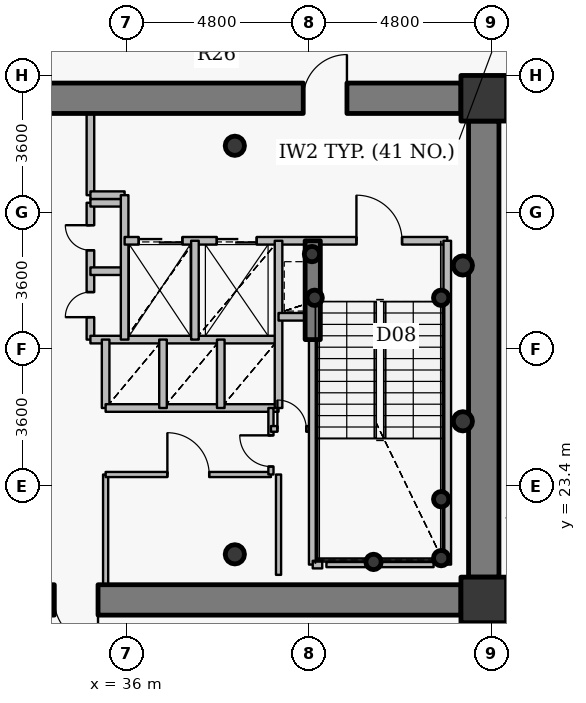
"""IFC4 building model, lengths in metres.
Left out: names, types, materials, properties, quantities, classifications, styles, units other than length and angle.
Written with IfcOpenShell. Run it as: python <this file> out.ifc"""

import sys

from ifc_helpers import new_model, si_unit, direction, frame, frame_2d, origin, origin_2d, place, context, subcontext, project, spatial, rectangle, hollow_circle, extrude, source, transform, mapped, element, fill, save


model = new_model("IFC4")
c1 = context("Model", 3, precision=1e-05, world=origin(), true_north=direction((0.0, 1.0)))
c2 = subcontext(c1, "Body", "Model", "MODEL_VIEW")
j1 = project(units=[si_unit("LENGTHUNIT", "METRE"), si_unit("PLANEANGLEUNIT", "RADIAN")], contexts=[c1])
p1 = place(None, origin())
s1 = spatial("IfcSite", under=j1, at=p1, CompositionType="ELEMENT")
p2 = place(p1, origin())
s2 = spatial("IfcBuilding", under=s1, at=p2, CompositionType="ELEMENT")
p3 = place(p2, frame((0.0, 0.0, 182.4)))
s3 = spatial("IfcBuildingStorey", under=s2, at=p3, CompositionType="ELEMENT", Elevation=182.4)
for number, where, z_axis, x_axis in (
    (1, (45.4, 20.4, 0.0), (0.0, 0.0, 1.0), (1.0, 0.0, 0.0)),
    (2, (45.4, 33.6, 0.0), (0.0, 0.0, 1.0), (1.0, 0.0, 0.0)),
):
    element("IfcColumn", number, at=place(p3, frame(where, z_axis=z_axis, x_axis=x_axis)), inside=s3, PredefinedType="COLUMN", context=c2, shape_type="SweptSolid", body=[
        extrude(rectangle(XDim=1.2, YDim=1.2, at=origin_2d()), origin(), (0.0, 0.0, 1.0), 3.75),
    ])
for number, where, z_axis, x_axis in (
    (3, (38.85, 21.6, 0.0), (0.0, 0.0, 1.0), (1.0, 0.0, 0.0)),
    (4, (38.85, 32.35, 0.0), (0.0, 0.0, 1.0), (1.0, 0.0, 0.0)),
):
    element("IfcColumn", number, at=place(p3, frame(where, z_axis=z_axis, x_axis=x_axis)), inside=s3, PredefinedType="COLUMN", context=c2, shape_type="SweptSolid", body=[
        extrude(hollow_circle(Radius=0.254, WallThickness=0.02, at=origin_2d()), origin(), (0.0, 0.0, 1.0), 3.75),
    ])
for number, where, z_axis, x_axis in (
    (5, (44.28, 21.5, 0.0), (0.0, 0.0, 1.0), (1.0, 0.0, 0.0)),
    (6, (44.28, 23.05, 0.0), (0.0, 0.0, 1.0), (1.0, 0.0, 0.0)),
    (7, (42.5, 21.4, 0.0), (0.0, 0.0, 1.0), (1.0, 0.0, 0.0)),
    (8, (40.95, 28.35, 0.0), (0.0, 0.0, 1.0), (1.0, 0.0, 0.0)),
    (9, (44.28, 28.35, 0.0), (0.0, 0.0, 1.0), (1.0, 0.0, 0.0)),
    (10, (40.88, 29.5, 0.0), (0.0, 0.0, 1.0), (1.0, 0.0, 0.0)),
):
    element("IfcColumn", number, at=place(p3, frame(where, z_axis=z_axis, x_axis=x_axis)), inside=s3, PredefinedType="COLUMN", context=c2, shape_type="SweptSolid", body=[
        extrude(hollow_circle(Radius=0.203, WallThickness=0.016, at=origin_2d()), origin(), (0.0, 0.0, 1.0), 3.75),
    ])
p4 = place(p3, frame((27.2, 33.6, 0.0), z_axis=(0.0, 0.0, 1.0), x_axis=(1.0, 0.0, 0.0)))
e11 = element("IfcWall", 11, at=p4, inside=s3, PredefinedType="SHEAR", context=c2, shape_type="SweptSolid", body=[
    extrude(rectangle(XDim=17.6, YDim=0.8, at=frame_2d((8.8, 0.0))), origin(), (0.0, 0.0, 1.0), 2.95),
])
p5 = place(p4, frame((13.45, 0.0, 0.0)))
e12 = element("IfcOpeningElement", 12, at=p5, cuts=e11, PredefinedType="OPENING", context=c2, shape_type="SweptSolid", body=[
    extrude(rectangle(XDim=1.15, YDim=2.15, at=origin_2d()), frame((0.575, 0.41, 1.075), z_axis=(0.0, -1.0, 0.0), x_axis=(1.0, 0.0, 0.0)), (0.0, 0.0, 1.0), 0.82),
])
p6 = place(p3, frame((45.4, 33.0, 0.0), z_axis=(0.0, 0.0, 1.0), x_axis=(0.0, -1.0, 0.0)))
e13 = element("IfcWall", 13, at=p6, inside=s3, PredefinedType="SHEAR", context=c2, shape_type="SweptSolid", body=[
    extrude(rectangle(XDim=12.0, YDim=0.8, at=frame_2d((6.0, 0.0))), origin(), (0.0, 0.0, 1.0), 2.95),
])
p7 = place(p3, frame((44.8, 20.4, 0.0), z_axis=(0.0, 0.0, 1.0), x_axis=(-1.0, 0.0, 0.0)))
e14 = element("IfcWall", 14, at=p7, inside=s3, PredefinedType="SHEAR", context=c2, shape_type="SweptSolid", body=[
    extrude(rectangle(XDim=17.6, YDim=0.8, at=frame_2d((8.8, 0.0))), origin(), (0.0, 0.0, 1.0), 2.95),
])
p8 = place(p7, frame((9.55, 0.0, 0.0)))
e15 = element("IfcOpeningElement", 15, at=p8, cuts=e14, PredefinedType="OPENING", context=c2, shape_type="SweptSolid", body=[
    extrude(rectangle(XDim=1.15, YDim=2.15, at=origin_2d()), frame((0.575, 0.41, 1.075), z_axis=(0.0, -1.0, 0.0), x_axis=(1.0, 0.0, 0.0)), (0.0, 0.0, 1.0), 0.82),
])
p9 = place(p3, frame((40.9, 27.25, 0.0), z_axis=(0.0, 0.0, 1.0), x_axis=(0.0, 1.0, 0.0)))
e16 = element("IfcWall", 16, at=p9, inside=s3, PredefinedType="SHEAR", context=c2, shape_type="SweptSolid", body=[
    extrude(rectangle(XDim=2.6, YDim=0.4, at=frame_2d((1.3, 0.0))), origin(), (0.0, 0.0, 1.0), 3.1),
])
for number, where, z_axis, x_axis in (
    (17, (44.85, 25.1, 0.0), (0.0, 0.0, 1.0), (1.0, 0.0, 0.0)),
    (18, (44.85, 29.2, 0.0), (0.0, 0.0, 1.0), (1.0, 0.0, 0.0)),
):
    element("IfcColumn", number, at=place(p3, frame(where, z_axis=z_axis, x_axis=x_axis)), inside=s3, PredefinedType="COLUMN", context=c2, shape_type="SweptSolid", body=[
        extrude(hollow_circle(Radius=0.254, WallThickness=0.02, at=origin_2d()), origin(), (0.0, 0.0, 1.0), 3.75),
    ])
p10 = place(p3, frame((35.05, 27.25, 0.0), z_axis=(0.0, 0.0, 1.0), x_axis=(0.0, 1.0, 0.0)))
e19 = element("IfcWall", 19, at=p10, inside=s3, PredefinedType="PARTITIONING", context=c2, shape_type="SweptSolid", body=[
    extrude(rectangle(XDim=3.6, YDim=0.2, at=frame_2d((1.8, 0.0))), origin(), (0.0, 0.0, 1.0), 3.5),
])
p11 = place(p10, frame((0.59, 0.0, 0.0)))
e20 = element("IfcOpeningElement", 20, at=p11, cuts=e19, PredefinedType="OPENING", context=c2, shape_type="SweptSolid", body=[
    extrude(rectangle(XDim=0.66, YDim=2.05, at=origin_2d()), frame((0.33, 0.11, 1.025), z_axis=(0.0, -1.0, 0.0), x_axis=(1.0, 0.0, 0.0)), (0.0, 0.0, 1.0), 0.22),
])
p12 = place(p10, frame((2.35, 0.0, 0.0)))
e21 = element("IfcOpeningElement", 21, at=p12, cuts=e19, PredefinedType="OPENING", context=c2, shape_type="SweptSolid", body=[
    extrude(rectangle(XDim=0.66, YDim=2.05, at=origin_2d()), frame((0.33, 0.11, 1.025), z_axis=(0.0, -1.0, 0.0), x_axis=(1.0, 0.0, 0.0)), (0.0, 0.0, 1.0), 0.22),
])
p13 = place(p3, frame((35.05, 27.25, 0.0), z_axis=(0.0, 0.0, 1.0), x_axis=(1.0, 0.0, 0.0)))
e22 = element("IfcWall", 22, at=p13, inside=s3, PredefinedType="PARTITIONING", context=c2, shape_type="SweptSolid", body=[
    extrude(rectangle(XDim=4.95, YDim=0.2, at=frame_2d((2.475, 0.0))), origin(), (0.0, 0.0, 1.0), 3.085),
])
for number, where, z_axis, x_axis in (
    (23, (35.05, 29.05, 0.0), (0.0, 0.0, 1.0), (1.0, 0.0, 0.0)),
    (24, (35.05, 30.85, 0.0), (0.0, 0.0, 1.0), (1.0, 0.0, 0.0)),
):
    element("IfcWall", number, at=place(p3, frame(where, z_axis=z_axis, x_axis=x_axis)), inside=s3, PredefinedType="PARTITIONING", context=c2, shape_type="SweptSolid", body=[
        extrude(rectangle(XDim=0.9, YDim=0.2, at=frame_2d((0.45, 0.0))), origin(), (0.0, 0.0, 1.0), 3.5),
    ])
p14 = place(p3, frame((35.05, 31.05, 0.0), z_axis=(0.0, 0.0, 1.0), x_axis=(0.0, 1.0, 0.0)))
e25 = element("IfcWall", 25, at=p14, inside=s3, PredefinedType="PARTITIONING", context=c2, shape_type="SweptSolid", body=[
    extrude(rectangle(XDim=2.15, YDim=0.2, at=frame_2d((1.075, 0.0))), origin(), (0.0, 0.0, 1.0), 3.085),
])
p15 = place(p3, frame((35.05, 31.05, 0.0), z_axis=(0.0, 0.0, 1.0), x_axis=(1.0, 0.0, 0.0)))
e26 = element("IfcWall", 26, at=p15, inside=s3, PredefinedType="PARTITIONING", context=c2, shape_type="SweptSolid", body=[
    extrude(rectangle(XDim=0.9, YDim=0.2, at=frame_2d((0.45, 0.0))), origin(), (0.0, 0.0, 1.0), 3.5),
])
p16 = place(p3, frame((35.45, 20.8, 0.0), z_axis=(0.0, 0.0, 1.0), x_axis=(0.0, 1.0, 0.0)))
e27 = element("IfcWall", 27, at=p16, inside=s3, PredefinedType="PARTITIONING", context=c2, shape_type="SweptSolid", body=[
    extrude(rectangle(XDim=2.9, YDim=0.135, at=frame_2d((1.45, 0.0))), origin(), (0.0, 0.0, 1.0), 3.085),
])
p17 = place(p3, frame((35.45, 23.7, 0.0), z_axis=(0.0, 0.0, 1.0), x_axis=(1.0, 0.0, 0.0)))
e28 = element("IfcWall", 28, at=p17, inside=s3, PredefinedType="PARTITIONING", context=c2, shape_type="SweptSolid", body=[
    extrude(rectangle(XDim=4.35, YDim=0.135, at=frame_2d((2.175, 0.0))), origin(), (0.0, 0.0, 1.0), 3.085),
])
p18 = place(p17, frame((1.625, 0.0, 0.0)))
e29 = element("IfcOpeningElement", 29, at=p18, cuts=e28, PredefinedType="OPENING", context=c2, shape_type="SweptSolid", body=[
    extrude(rectangle(XDim=1.1, YDim=2.15, at=origin_2d()), frame((0.55, 0.078, 1.075), z_axis=(0.0, -1.0, 0.0), x_axis=(1.0, 0.0, 0.0)), (0.0, 0.0, 1.0), 0.155),
])
p19 = place(p3, frame((35.45, 25.45, 0.0), z_axis=(0.0, 0.0, 1.0), x_axis=(0.0, 1.0, 0.0)))
e30 = element("IfcWall", 30, at=p19, inside=s3, PredefinedType="PARTITIONING", context=c2, shape_type="SweptSolid", body=[
    extrude(rectangle(XDim=1.8, YDim=0.2, at=frame_2d((0.9, 0.0))), origin(), (0.0, 0.0, 1.0), 3.5),
])
p20 = place(p3, frame((35.45, 25.45, 0.0), z_axis=(0.0, 0.0, 1.0), x_axis=(1.0, 0.0, 0.0)))
e31 = element("IfcWall", 31, at=p20, inside=s3, PredefinedType="PARTITIONING", context=c2, shape_type="SweptSolid", body=[
    extrude(rectangle(XDim=4.55, YDim=0.2, at=frame_2d((2.275, 0.0))), origin(), (0.0, 0.0, 1.0), 3.085),
])
p21 = place(p3, frame((35.95, 27.25, 0.0), z_axis=(0.0, 0.0, 1.0), x_axis=(0.0, 1.0, 0.0)))
e32 = element("IfcWall", 32, at=p21, inside=s3, PredefinedType="PARTITIONING", context=c2, shape_type="SweptSolid", body=[
    extrude(rectangle(XDim=3.8, YDim=0.2, at=frame_2d((1.9, 0.0))), origin(), (0.0, 0.0, 1.0), 3.5),
])
p22 = place(p3, frame((35.95, 29.85, 0.0), z_axis=(0.0, 0.0, 1.0), x_axis=(1.0, 0.0, 0.0)))
e33 = element("IfcWall", 33, at=p22, inside=s3, PredefinedType="PARTITIONING", context=c2, shape_type="SweptSolid", body=[
    extrude(rectangle(XDim=8.49, YDim=0.2, at=frame_2d((4.245, 0.0))), origin(), (0.0, 0.0, 1.0), 3.085),
])
p23 = place(p22, frame((6.1, 0.0, 0.0)))
e34 = element("IfcOpeningElement", 34, at=p23, cuts=e33, PredefinedType="OPENING", context=c2, shape_type="SweptSolid", body=[
    extrude(rectangle(XDim=1.2, YDim=2.15, at=origin_2d()), frame((0.6, 0.11, 1.075), z_axis=(0.0, -1.0, 0.0), x_axis=(1.0, 0.0, 0.0)), (0.0, 0.0, 1.0), 0.22),
])
p24 = place(p22, frame((0.37, 0.0, 0.0)))
e35 = element("IfcOpeningElement", 35, at=p24, cuts=e33, PredefinedType="OPENING", context=c2, shape_type="SweptSolid", body=[
    extrude(rectangle(XDim=1.15, YDim=2.15, at=origin_2d()), frame((0.575, 0.11, 1.075), z_axis=(0.0, -1.0, 0.0), x_axis=(1.0, 0.0, 0.0)), (0.0, 0.0, 1.0), 0.22),
])
p25 = place(p22, frame((2.425, 0.0, 0.0)))
e36 = element("IfcOpeningElement", 36, at=p25, cuts=e33, PredefinedType="OPENING", context=c2, shape_type="SweptSolid", body=[
    extrude(rectangle(XDim=1.05, YDim=2.15, at=origin_2d()), frame((0.525, 0.11, 1.075), z_axis=(0.0, -1.0, 0.0), x_axis=(1.0, 0.0, 0.0)), (0.0, 0.0, 1.0), 0.22),
])
p26 = place(p3, frame((36.96, 25.45, 0.0), z_axis=(0.0, 0.0, 1.0), x_axis=(0.0, 1.0, 0.0)))
e37 = element("IfcWall", 37, at=p26, inside=s3, PredefinedType="PARTITIONING", context=c2, shape_type="SweptSolid", body=[
    extrude(rectangle(XDim=1.8, YDim=0.2, at=frame_2d((0.9, 0.0))), origin(), (0.0, 0.0, 1.0), 3.5),
])
p27 = place(p3, frame((37.8, 27.25, 0.0), z_axis=(0.0, 0.0, 1.0), x_axis=(0.0, 1.0, 0.0)))
e38 = element("IfcWall", 38, at=p27, inside=s3, PredefinedType="PARTITIONING", context=c2, shape_type="SweptSolid", body=[
    extrude(rectangle(XDim=2.6, YDim=0.2, at=frame_2d((1.3, 0.0))), origin(), (0.0, 0.0, 1.0), 3.5),
])
p28 = place(p3, frame((38.48, 25.45, 0.0), z_axis=(0.0, 0.0, 1.0), x_axis=(0.0, 1.0, 0.0)))
e39 = element("IfcWall", 39, at=p28, inside=s3, PredefinedType="PARTITIONING", context=c2, shape_type="SweptSolid", body=[
    extrude(rectangle(XDim=1.8, YDim=0.2, at=frame_2d((0.9, 0.0))), origin(), (0.0, 0.0, 1.0), 3.5),
])
p29 = place(p3, frame((39.8, 23.7, 0.0), z_axis=(0.0, 0.0, 1.0), x_axis=(0.0, 1.0, 0.0)))
e40 = element("IfcWall", 40, at=p29, inside=s3, PredefinedType="PARTITIONING", context=c2, shape_type="SweptSolid", body=[
    extrude(rectangle(XDim=1.75, YDim=0.135, at=frame_2d((0.875, 0.0))), origin(), (0.0, 0.0, 1.0), 3.5),
])
p30 = place(p29, frame((0.21, 0.0, 0.0)))
e41 = element("IfcOpeningElement", 41, at=p30, cuts=e40, PredefinedType="OPENING", context=c2, shape_type="SweptSolid", body=[
    extrude(rectangle(XDim=0.82, YDim=2.1, at=origin_2d()), frame((0.41, 0.078, 1.05), z_axis=(0.0, -1.0, 0.0), x_axis=(1.0, 0.0, 0.0)), (0.0, 0.0, 1.0), 0.155),
])
p31 = place(p3, frame((39.8, 24.9, 0.0), z_axis=(0.0, 0.0, 1.0), x_axis=(1.0, 0.0, 0.0)))
e42 = element("IfcWall", 42, at=p31, inside=s3, PredefinedType="PARTITIONING", context=c2, shape_type="SweptSolid", body=[
    extrude(rectangle(XDim=1.1, YDim=0.15, at=frame_2d((0.55, 0.0))), origin(), (0.0, 0.0, 1.0), 3.5),
])
p32 = place(p31, frame((0.17, 0.0, 0.0)))
e43 = element("IfcOpeningElement", 43, at=p32, cuts=e42, PredefinedType="OPENING", context=c2, shape_type="SweptSolid", body=[
    extrude(rectangle(XDim=0.76, YDim=2.1, at=origin_2d()), frame((0.38, 0.085, 1.05), z_axis=(0.0, -1.0, 0.0), x_axis=(1.0, 0.0, 0.0)), (0.0, 0.0, 1.0), 0.17),
])
p33 = place(p3, frame((40.0, 25.45, 0.0), z_axis=(0.0, 0.0, 1.0), x_axis=(0.0, 1.0, 0.0)))
e44 = element("IfcWall", 44, at=p33, inside=s3, PredefinedType="PARTITIONING", context=c2, shape_type="SweptSolid", body=[
    extrude(rectangle(XDim=4.4, YDim=0.2, at=frame_2d((2.2, 0.0))), origin(), (0.0, 0.0, 1.0), 3.5),
])
p34 = place(p3, frame((40.0, 27.85, 0.0), z_axis=(0.0, 0.0, 1.0), x_axis=(1.0, 0.0, 0.0)))
e45 = element("IfcWall", 45, at=p34, inside=s3, PredefinedType="PARTITIONING", context=c2, shape_type="SweptSolid", body=[
    extrude(rectangle(XDim=0.9, YDim=0.2, at=frame_2d((0.45, 0.0))), origin(), (0.0, 0.0, 1.0), 3.5),
])
p35 = place(p3, frame((40.9, 21.33, 0.0), z_axis=(0.0, 0.0, 1.0), x_axis=(0.0, 1.0, 0.0)))
e46 = element("IfcWall", 46, at=p35, inside=s3, PredefinedType="PARTITIONING", context=c2, shape_type="SweptSolid", body=[
    extrude(rectangle(XDim=5.91, YDim=0.2, at=frame_2d((2.955, 0.0))), origin(), (0.0, 0.0, 1.0), 3.035),
])
p36 = place(p3, frame((40.9, 21.33, 0.0), z_axis=(0.0, 0.0, 1.0), x_axis=(1.0, 0.0, 0.0)))
e47 = element("IfcWall", 47, at=p36, inside=s3, PredefinedType="PARTITIONING", context=c2, shape_type="SweptSolid", body=[
    extrude(rectangle(XDim=0.25, YDim=0.2, at=frame_2d((0.125, 0.0))), origin(), (0.0, 0.0, 1.0), 3.035),
])
p37 = place(p3, frame((44.44, 21.33, 0.0), z_axis=(0.0, 0.0, 1.0), x_axis=(0.0, 1.0, 0.0)))
e48 = element("IfcWall", 48, at=p37, inside=s3, PredefinedType="PARTITIONING", context=c2, shape_type="SweptSolid", body=[
    extrude(rectangle(XDim=8.52, YDim=0.2, at=frame_2d((4.26, 0.0))), origin(), (0.0, 0.0, 1.0), 3.5),
])
p38 = place(p3, frame((45.8, 20.05, 0.0), z_axis=(0.0, 0.0, 1.0), x_axis=(1.0, 0.0, 0.0)))
e49 = element("IfcWall", 49, at=p38, inside=s3, PredefinedType="PARTITIONING", context=c2, shape_type="SweptSolid", body=[
    extrude(rectangle(XDim=2.4, YDim=0.135, at=frame_2d((1.2, 0.0))), origin(), (0.0, 0.0, 1.0), 3.5),
])
p39 = place(p3, frame((44.08, 21.33, 0.0), z_axis=(0.0, 0.0, 1.0), x_axis=(-1.0, 0.0, 0.0)))
e50 = element("IfcWall", 50, at=p39, inside=s3, PredefinedType="PARTITIONING", context=c2, shape_type="SweptSolid", body=[
    extrude(rectangle(XDim=2.82, YDim=0.135, at=frame_2d((1.41, 0.0))), origin(), (0.0, 0.0, 1.0), 3.035),
])
p40 = place(p3, frame((40.0, 23.7, 0.0), z_axis=(0.0, 0.0, 1.0), x_axis=(0.0, -1.0, 0.0)))
e51 = element("IfcWall", 51, at=p40, inside=s3, PredefinedType="PARTITIONING", context=c2, shape_type="SweptSolid", body=[
    extrude(rectangle(XDim=2.64, YDim=0.135, at=frame_2d((1.32, 0.0))), origin(), (0.0, 0.0, 1.0), 3.035),
])
p41 = place(p3, frame((49.061, 33.95, 0.0), z_axis=(0.0, 0.0, 1.0), x_axis=(-1.0, 0.0, 0.0)))
e52 = element("IfcWall", 52, at=p41, inside=s3, PredefinedType="PARTITIONING", context=c2, shape_type="SweptSolid", body=[
    extrude(rectangle(XDim=3.261, YDim=0.135, at=frame_2d((1.63, 0.0))), origin(), (0.0, 0.0, 1.0), 3.5),
])
for number, where, z_axis, x_axis in (
    (53, (45.79, 34.0, 0.0), (0.0, 0.0, 1.0), (-1.0, 0.0, 0.0)),
    (54, (44.81, 20.0, 0.0), (0.0, 0.0, 1.0), (1.0, 0.0, 0.0)),
):
    element("IfcWall", number, at=place(p3, frame(where, z_axis=z_axis, x_axis=x_axis)), inside=s3, PredefinedType="PARTITIONING", context=c2, shape_type="SweptSolid", body=[
        extrude(rectangle(XDim=0.98, YDim=0.135, at=frame_2d((0.49, 0.0))), origin(), (0.0, 0.0, 1.0), 2.935),
    ])
p42 = place(p3, frame((45.8, 20.377, 0.0), z_axis=(0.0, 0.0, 1.0), x_axis=(0.0, 1.0, 0.0)))
e55 = element("IfcWall", 55, at=p42, inside=s3, PredefinedType="PARTITIONING", context=c2, shape_type="SweptSolid", body=[
    extrude(rectangle(XDim=0.613, YDim=0.135, at=frame_2d((0.306, 0.0))), origin(), (0.0, 0.0, 1.0), 3.5),
])
m1 = source(origin(), c2, "Body", "SweptSolid", [
    extrude(rectangle(XDim=1.15, YDim=2.15, at=origin_2d()), frame((0.575, 0.025, 1.075), z_axis=(0.0, -1.0, 0.0), x_axis=(1.0, 0.0, 0.0)), (0.0, 0.0, 1.0), 0.05),
])
p43 = place(p5, origin())
e56 = element("IfcDoor", 56, at=p43, inside=s3, OperationType="SINGLE_SWING_RIGHT", PredefinedType="DOOR", context=c2, shape_type="MappedRepresentation", body=[
    mapped(m1, transform((0.0, 0.0, 0.0), x_axis=(1.0, 0.0, 0.0), y_axis=(0.0, 1.0, 0.0), z_axis=(0.0, 0.0, 1.0), scale=1.0)),
])
fill(e12, e56)
p44 = place(p8, origin())
e57 = element("IfcDoor", 57, at=p44, inside=s3, OperationType="SINGLE_SWING_LEFT", PredefinedType="DOOR", context=c2, shape_type="MappedRepresentation", body=[
    mapped(m1, transform((0.0, 0.0, 0.0), x_axis=(1.0, 0.0, 0.0), y_axis=(0.0, 1.0, 0.0), z_axis=(0.0, 0.0, 1.0), scale=1.0)),
])
fill(e15, e57)
m2 = source(origin(), c2, "Body", "SweptSolid", [
    extrude(rectangle(XDim=1.2, YDim=2.15, at=origin_2d()), frame((0.6, 0.025, 1.075), z_axis=(0.0, -1.0, 0.0), x_axis=(1.0, 0.0, 0.0)), (0.0, 0.0, 1.0), 0.05),
])
p45 = place(p23, origin())
e58 = element("IfcDoor", 58, at=p45, inside=s3, OperationType="SINGLE_SWING_LEFT", PredefinedType="DOOR", context=c2, shape_type="MappedRepresentation", body=[
    mapped(m2, transform((0.0, 0.0, 0.0), x_axis=(1.0, 0.0, 0.0), y_axis=(0.0, 1.0, 0.0), z_axis=(0.0, 0.0, 1.0), scale=1.0)),
])
fill(e34, e58)
m3 = source(origin(), c2, "Body", "SweptSolid", [
    extrude(rectangle(XDim=1.15, YDim=2.15, at=origin_2d()), frame((0.575, 0.025, 1.075), z_axis=(0.0, -1.0, 0.0), x_axis=(1.0, 0.0, 0.0)), (0.0, 0.0, 1.0), 0.05),
])
p46 = place(p24, origin())
e59 = element("IfcDoor", 59, at=p46, inside=s3, OperationType="DOUBLE_DOOR_SLIDING", PredefinedType="USERDEFINED", context=c2, shape_type="MappedRepresentation", body=[
    mapped(m3, transform((0.0, 0.0, 0.0), x_axis=(1.0, 0.0, 0.0), y_axis=(0.0, 1.0, 0.0), z_axis=(0.0, 0.0, 1.0), scale=1.0)),
])
fill(e35, e59)
m4 = source(origin(), c2, "Body", "SweptSolid", [
    extrude(rectangle(XDim=1.05, YDim=2.15, at=origin_2d()), frame((0.525, 0.025, 1.075), z_axis=(0.0, -1.0, 0.0), x_axis=(1.0, 0.0, 0.0)), (0.0, 0.0, 1.0), 0.05),
])
p47 = place(p25, origin())
e60 = element("IfcDoor", 60, at=p47, inside=s3, OperationType="DOUBLE_DOOR_SLIDING", PredefinedType="USERDEFINED", context=c2, shape_type="MappedRepresentation", body=[
    mapped(m4, transform((0.0, 0.0, 0.0), x_axis=(1.0, 0.0, 0.0), y_axis=(0.0, 1.0, 0.0), z_axis=(0.0, 0.0, 1.0), scale=1.0)),
])
fill(e36, e60)
m5 = source(origin(), c2, "Body", "SweptSolid", [
    extrude(rectangle(XDim=0.66, YDim=2.05, at=origin_2d()), frame((0.33, 0.025, 1.025), z_axis=(0.0, -1.0, 0.0), x_axis=(1.0, 0.0, 0.0)), (0.0, 0.0, 1.0), 0.05),
])
p48 = place(p11, origin())
e61 = element("IfcDoor", 61, at=p48, inside=s3, OperationType="SINGLE_SWING_LEFT", PredefinedType="USERDEFINED", context=c2, shape_type="MappedRepresentation", body=[
    mapped(m5, transform((0.0, 0.0, 0.0), x_axis=(1.0, 0.0, 0.0), y_axis=(0.0, 1.0, 0.0), z_axis=(0.0, 0.0, 1.0), scale=1.0)),
])
fill(e20, e61)
p49 = place(p12, origin())
e62 = element("IfcDoor", 62, at=p49, inside=s3, OperationType="SINGLE_SWING_RIGHT", PredefinedType="USERDEFINED", context=c2, shape_type="MappedRepresentation", body=[
    mapped(m5, transform((0.0, 0.0, 0.0), x_axis=(1.0, 0.0, 0.0), y_axis=(0.0, 1.0, 0.0), z_axis=(0.0, 0.0, 1.0), scale=1.0)),
])
fill(e21, e62)
m6 = source(origin(), c2, "Body", "SweptSolid", [
    extrude(rectangle(XDim=1.1, YDim=2.15, at=origin_2d()), frame((0.55, 0.025, 1.075), z_axis=(0.0, -1.0, 0.0), x_axis=(1.0, 0.0, 0.0)), (0.0, 0.0, 1.0), 0.05),
])
p50 = place(p18, origin())
e63 = element("IfcDoor", 63, at=p50, inside=s3, OperationType="SINGLE_SWING_LEFT", PredefinedType="DOOR", context=c2, shape_type="MappedRepresentation", body=[
    mapped(m6, transform((0.0, 0.0, 0.0), x_axis=(1.0, 0.0, 0.0), y_axis=(0.0, 1.0, 0.0), z_axis=(0.0, 0.0, 1.0), scale=1.0)),
])
fill(e29, e63)
m7 = source(origin(), c2, "Body", "SweptSolid", [
    extrude(rectangle(XDim=0.82, YDim=2.1, at=origin_2d()), frame((0.41, 0.025, 1.05), z_axis=(0.0, -1.0, 0.0), x_axis=(1.0, 0.0, 0.0)), (0.0, 0.0, 1.0), 0.05),
])
p51 = place(p30, origin())
e64 = element("IfcDoor", 64, at=p51, inside=s3, OperationType="SINGLE_SWING_RIGHT", PredefinedType="DOOR", context=c2, shape_type="MappedRepresentation", body=[
    mapped(m7, transform((0.0, 0.0, 0.0), x_axis=(1.0, 0.0, 0.0), y_axis=(0.0, 1.0, 0.0), z_axis=(0.0, 0.0, 1.0), scale=1.0)),
])
fill(e41, e64)
m8 = source(origin(), c2, "Body", "SweptSolid", [
    extrude(rectangle(XDim=0.76, YDim=2.1, at=origin_2d()), frame((0.38, 0.025, 1.05), z_axis=(0.0, -1.0, 0.0), x_axis=(1.0, 0.0, 0.0)), (0.0, 0.0, 1.0), 0.05),
])
p52 = place(p32, origin())
e65 = element("IfcDoor", 65, at=p52, inside=s3, OperationType="SINGLE_SWING_LEFT", PredefinedType="DOOR", context=c2, shape_type="MappedRepresentation", body=[
    mapped(m8, transform((0.0, 0.0, 0.0), x_axis=(1.0, 0.0, 0.0), y_axis=(0.0, 1.0, 0.0), z_axis=(0.0, 0.0, 1.0), scale=1.0)),
])
fill(e43, e65)
save(model, sys.argv[1])
